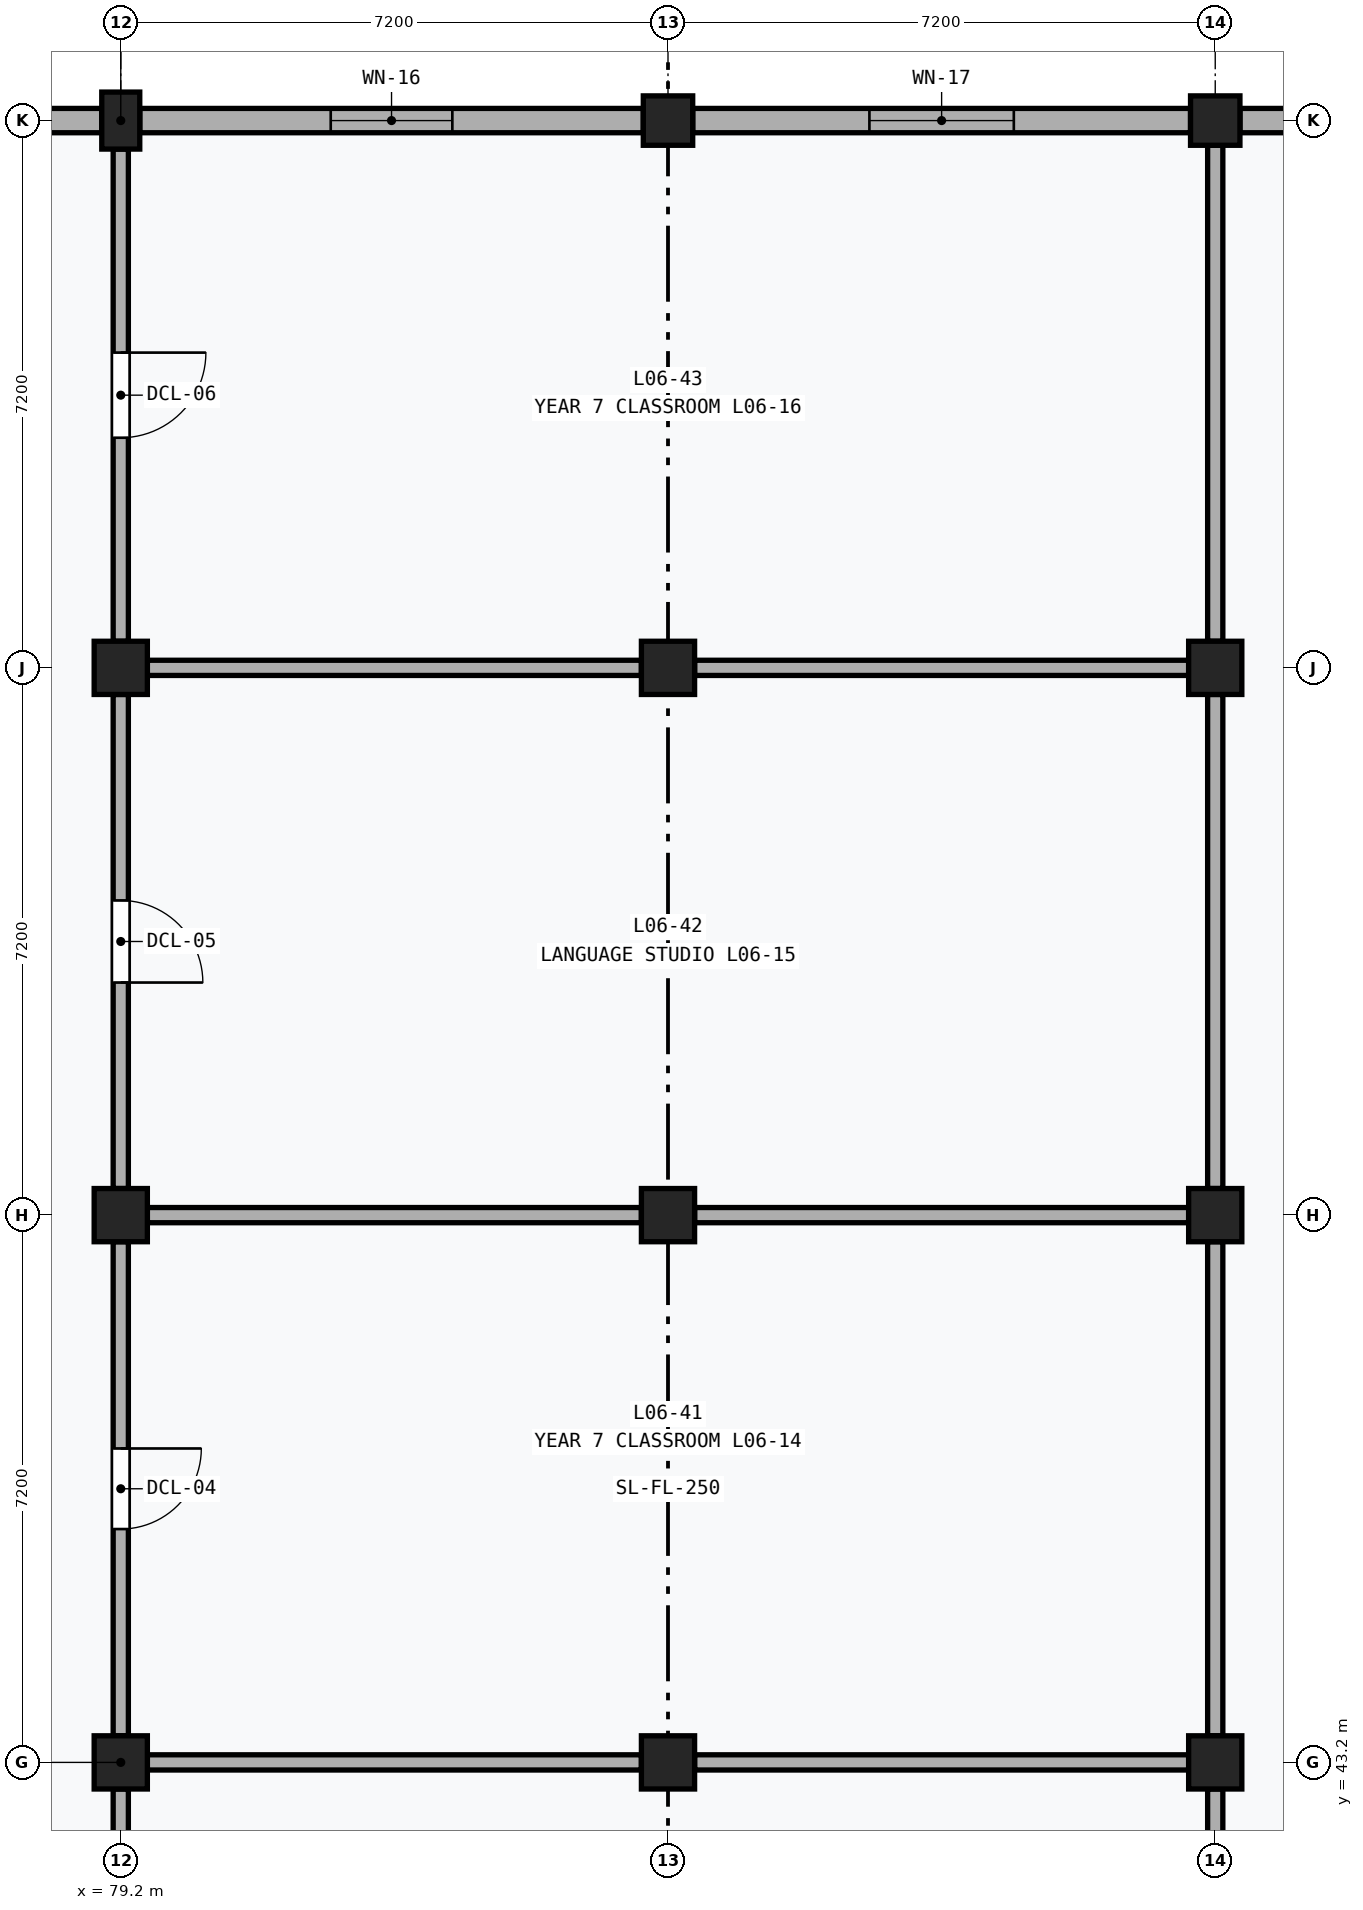
"""IFC4 building model, lengths in metres.
Left out: names, types, materials, properties, quantities, classifications, styles, units other than length and angle.
Written with IfcOpenShell. Run it as: python <this file> out.ifc"""

import sys

from ifc_helpers import new_model, si_unit, direction, frame, frame_2d, origin, origin_2d, place, context, subcontext, project, spatial, rectangle, extrude, element, fill, save


model = new_model("IFC4")
c1 = context("Model", 3, precision=1e-05, world=origin(), true_north=direction((0.0, 1.0)))
c2 = subcontext(c1, "Body", "Model", "MODEL_VIEW")
j1 = project(units=[si_unit("LENGTHUNIT", "METRE"), si_unit("PLANEANGLEUNIT", "RADIAN")], contexts=[c1])
p1 = place(None, origin())
s1 = spatial("IfcSite", under=j1, at=p1, CompositionType="ELEMENT")
p2 = place(p1, origin())
s2 = spatial("IfcBuilding", under=s1, at=p2, CompositionType="ELEMENT")
p3 = place(p2, frame((0.0, 0.0, 26.6)))
s3 = spatial("IfcBuildingStorey", under=s2, at=p3, CompositionType="ELEMENT", Elevation=26.6)
for number, where, z_axis, x_axis in (
    (1, (79.2, 43.2, 0.0), (0.0, 0.0, 1.0), (1.0, 0.0, 0.0)),
    (2, (79.2, 50.4, 0.0), (0.0, 0.0, 1.0), (1.0, 0.0, 0.0)),
    (3, (79.2, 57.6, 0.0), (0.0, 0.0, 1.0), (1.0, 0.0, 0.0)),
):
    element("IfcColumn", number, at=place(p3, frame(where, z_axis=z_axis, x_axis=x_axis)), inside=s3, PredefinedType="COLUMN", context=c2, shape_type="SweptSolid", body=[
        extrude(rectangle(XDim=0.7, YDim=0.7, at=origin_2d()), origin(), (0.0, 0.0, 1.0), 4.0),
    ])
p4 = place(p3, frame((79.2, 64.8, 0.0), z_axis=(0.0, 0.0, 1.0), x_axis=(1.0, 0.0, 0.0)))
e4 = element("IfcColumn", 4, at=p4, inside=s3, PredefinedType="PILASTER", context=c2, shape_type="SweptSolid", body=[
    extrude(rectangle(XDim=0.5, YDim=0.75, at=origin_2d()), origin(), (0.0, 0.0, 1.0), 4.0),
])
for number, where, z_axis, x_axis in (
    (5, (86.4, 43.2, 0.0), (0.0, 0.0, 1.0), (1.0, 0.0, 0.0)),
    (6, (86.4, 50.4, 0.0), (0.0, 0.0, 1.0), (1.0, 0.0, 0.0)),
    (7, (86.4, 57.6, 0.0), (0.0, 0.0, 1.0), (1.0, 0.0, 0.0)),
):
    element("IfcColumn", number, at=place(p3, frame(where, z_axis=z_axis, x_axis=x_axis)), inside=s3, PredefinedType="COLUMN", context=c2, shape_type="SweptSolid", body=[
        extrude(rectangle(XDim=0.7, YDim=0.7, at=origin_2d()), origin(), (0.0, 0.0, 1.0), 4.0),
    ])
p5 = place(p3, frame((86.4, 64.8, 0.0), z_axis=(0.0, 0.0, 1.0), x_axis=(1.0, 0.0, 0.0)))
e8 = element("IfcColumn", 8, at=p5, inside=s3, PredefinedType="COLUMN", context=c2, shape_type="SweptSolid", body=[
    extrude(rectangle(XDim=0.65, YDim=0.65, at=origin_2d()), origin(), (0.0, 0.0, 1.0), 4.0),
])
for number, where, z_axis, x_axis in (
    (9, (93.6, 43.2, 0.0), (0.0, 0.0, 1.0), (1.0, 0.0, 0.0)),
    (10, (93.6, 50.4, 0.0), (0.0, 0.0, 1.0), (1.0, 0.0, 0.0)),
    (11, (93.6, 57.6, 0.0), (0.0, 0.0, 1.0), (1.0, 0.0, 0.0)),
):
    element("IfcColumn", number, at=place(p3, frame(where, z_axis=z_axis, x_axis=x_axis)), inside=s3, PredefinedType="COLUMN", context=c2, shape_type="SweptSolid", body=[
        extrude(rectangle(XDim=0.7, YDim=0.7, at=origin_2d()), origin(), (0.0, 0.0, 1.0), 4.0),
    ])
p6 = place(p3, frame((93.6, 64.8, 0.0), z_axis=(0.0, 0.0, 1.0), x_axis=(1.0, 0.0, 0.0)))
e12 = element("IfcColumn", 12, at=p6, inside=s3, PredefinedType="COLUMN", context=c2, shape_type="SweptSolid", body=[
    extrude(rectangle(XDim=0.65, YDim=0.65, at=origin_2d()), origin(), (0.0, 0.0, 1.0), 4.0),
])
p7 = place(p3, frame((72.325, 64.8, 0.0), z_axis=(0.0, 0.0, 1.0), x_axis=(1.0, 0.0, 0.0)))
e13 = element("IfcWall", 13, at=p7, inside=s3, PredefinedType="SOLIDWALL", context=c2, shape_type="SweptSolid", body=[
    extrude(rectangle(XDim=6.625, YDim=0.32, at=frame_2d((3.312, 0.0))), origin(), (0.0, 0.0, 1.0), 3.1),
])
p8 = place(p7, frame((2.562, 0.0, 1.1)))
e14 = element("IfcOpeningElement", 14, at=p8, cuts=e13, PredefinedType="OPENING", context=c2, shape_type="SweptSolid", body=[
    extrude(rectangle(XDim=1.5, YDim=1.35, at=frame_2d((0.75, 0.675))), frame((0.0, 0.172, 0.0), z_axis=(0.0, -1.0, 0.0), x_axis=(1.0, 0.0, 0.0)), (0.0, 0.0, 1.0), 0.344),
])
p9 = place(p3, frame((79.45, 64.8, 0.0), z_axis=(0.0, 0.0, 1.0), x_axis=(1.0, 0.0, 0.0)))
e15 = element("IfcWall", 15, at=p9, inside=s3, PredefinedType="SOLIDWALL", context=c2, shape_type="SweptSolid", body=[
    extrude(rectangle(XDim=6.625, YDim=0.32, at=frame_2d((3.312, 0.0))), origin(), (0.0, 0.0, 1.0), 3.1),
])
p10 = place(p9, frame((2.512, 0.0, 1.1)))
e16 = element("IfcOpeningElement", 16, at=p10, cuts=e15, PredefinedType="OPENING", context=c2, shape_type="SweptSolid", body=[
    extrude(rectangle(XDim=1.6, YDim=1.5, at=frame_2d((0.8, 0.75))), frame((0.0, 0.172, 0.0), z_axis=(0.0, -1.0, 0.0), x_axis=(1.0, 0.0, 0.0)), (0.0, 0.0, 1.0), 0.344),
])
p11 = place(p3, frame((86.725, 64.8, 0.0), z_axis=(0.0, 0.0, 1.0), x_axis=(1.0, 0.0, 0.0)))
e17 = element("IfcWall", 17, at=p11, inside=s3, PredefinedType="SOLIDWALL", context=c2, shape_type="SweptSolid", body=[
    extrude(rectangle(XDim=6.55, YDim=0.32, at=frame_2d((3.275, 0.0))), origin(), (0.0, 0.0, 1.0), 3.1),
])
p12 = place(p11, frame((2.325, 0.0, 1.1)))
e18 = element("IfcOpeningElement", 18, at=p12, cuts=e17, PredefinedType="OPENING", context=c2, shape_type="SweptSolid", body=[
    extrude(rectangle(XDim=1.9, YDim=1.5, at=frame_2d((0.95, 0.75))), frame((0.0, 0.172, 0.0), z_axis=(0.0, -1.0, 0.0), x_axis=(1.0, 0.0, 0.0)), (0.0, 0.0, 1.0), 0.344),
])
p13 = place(p3, frame((93.925, 64.8, 0.0), z_axis=(0.0, 0.0, 1.0), x_axis=(1.0, 0.0, 0.0)))
e19 = element("IfcWall", 19, at=p13, inside=s3, PredefinedType="SOLIDWALL", context=c2, shape_type="SweptSolid", body=[
    extrude(rectangle(XDim=6.55, YDim=0.32, at=frame_2d((3.275, 0.0))), origin(), (0.0, 0.0, 1.0), 3.1),
])
p14 = place(p13, frame((2.175, 0.0, 1.1)))
e20 = element("IfcOpeningElement", 20, at=p14, cuts=e19, PredefinedType="OPENING", context=c2, shape_type="SweptSolid", body=[
    extrude(rectangle(XDim=2.2, YDim=1.5, at=frame_2d((1.1, 0.75))), frame((0.0, 0.172, 0.0), z_axis=(0.0, -1.0, 0.0), x_axis=(1.0, 0.0, 0.0)), (0.0, 0.0, 1.0), 0.344),
])
p15 = place(p3, frame((79.55, 43.2, 0.0), z_axis=(0.0, 0.0, 1.0), x_axis=(1.0, 0.0, 0.0)))
e21 = element("IfcWall", 21, at=p15, inside=s3, PredefinedType="PARTITIONING", context=c2, shape_type="SweptSolid", body=[
    extrude(rectangle(XDim=6.5, YDim=0.2, at=frame_2d((3.25, 0.0))), origin(), (0.0, 0.0, 1.0), 2.96),
])
p16 = place(p3, frame((79.2, 36.35, 0.0), z_axis=(0.0, 0.0, 1.0), x_axis=(0.0, 1.0, 0.0)))
e22 = element("IfcWall", 22, at=p16, inside=s3, PredefinedType="PARTITIONING", context=c2, shape_type="SweptSolid", body=[
    extrude(rectangle(XDim=6.5, YDim=0.2, at=frame_2d((3.25, 0.0))), origin(), (0.0, 0.0, 1.0), 2.96),
])
p17 = place(p16, frame((2.73, 0.0, 0.0)))
e23 = element("IfcOpeningElement", 23, at=p17, cuts=e22, PredefinedType="OPENING", context=c2, shape_type="SweptSolid", body=[
    extrude(rectangle(XDim=1.04, YDim=2.14, at=frame_2d((0.52, 1.07))), frame((0.0, 0.112, 0.0), z_axis=(0.0, -1.0, 0.0), x_axis=(1.0, 0.0, 0.0)), (0.0, 0.0, 1.0), 0.224),
])
for number, where, z_axis, x_axis in (
    (24, (86.75, 43.2, 0.0), (0.0, 0.0, 1.0), (1.0, 0.0, 0.0)),
    (25, (93.6, 36.35, 0.0), (0.0, 0.0, 1.0), (0.0, 1.0, 0.0)),
    (26, (79.55, 50.4, 0.0), (0.0, 0.0, 1.0), (1.0, 0.0, 0.0)),
):
    element("IfcWall", number, at=place(p3, frame(where, z_axis=z_axis, x_axis=x_axis)), inside=s3, PredefinedType="PARTITIONING", context=c2, shape_type="SweptSolid", body=[
        extrude(rectangle(XDim=6.5, YDim=0.2, at=frame_2d((3.25, 0.0))), origin(), (0.0, 0.0, 1.0), 2.96),
    ])
p18 = place(p3, frame((79.2, 43.55, 0.0), z_axis=(0.0, 0.0, 1.0), x_axis=(0.0, 1.0, 0.0)))
e27 = element("IfcWall", 27, at=p18, inside=s3, PredefinedType="PARTITIONING", context=c2, shape_type="SweptSolid", body=[
    extrude(rectangle(XDim=6.5, YDim=0.2, at=frame_2d((3.25, 0.0))), origin(), (0.0, 0.0, 1.0), 2.96),
])
p19 = place(p18, frame((2.72, 0.0, 0.0)))
e28 = element("IfcOpeningElement", 28, at=p19, cuts=e27, PredefinedType="OPENING", context=c2, shape_type="SweptSolid", body=[
    extrude(rectangle(XDim=1.06, YDim=2.16, at=frame_2d((0.53, 1.08))), frame((0.0, 0.112, 0.0), z_axis=(0.0, -1.0, 0.0), x_axis=(1.0, 0.0, 0.0)), (0.0, 0.0, 1.0), 0.224),
])
for number, where, z_axis, x_axis in (
    (29, (86.75, 50.4, 0.0), (0.0, 0.0, 1.0), (1.0, 0.0, 0.0)),
    (30, (93.6, 43.55, 0.0), (0.0, 0.0, 1.0), (0.0, 1.0, 0.0)),
    (31, (79.55, 57.6, 0.0), (0.0, 0.0, 1.0), (1.0, 0.0, 0.0)),
):
    element("IfcWall", number, at=place(p3, frame(where, z_axis=z_axis, x_axis=x_axis)), inside=s3, PredefinedType="PARTITIONING", context=c2, shape_type="SweptSolid", body=[
        extrude(rectangle(XDim=6.5, YDim=0.2, at=frame_2d((3.25, 0.0))), origin(), (0.0, 0.0, 1.0), 2.96),
    ])
p20 = place(p3, frame((79.2, 50.75, 0.0), z_axis=(0.0, 0.0, 1.0), x_axis=(0.0, 1.0, 0.0)))
e32 = element("IfcWall", 32, at=p20, inside=s3, PredefinedType="PARTITIONING", context=c2, shape_type="SweptSolid", body=[
    extrude(rectangle(XDim=6.5, YDim=0.2, at=frame_2d((3.25, 0.0))), origin(), (0.0, 0.0, 1.0), 2.96),
])
p21 = place(p20, frame((2.71, 0.0, 0.0)))
e33 = element("IfcOpeningElement", 33, at=p21, cuts=e32, PredefinedType="OPENING", context=c2, shape_type="SweptSolid", body=[
    extrude(rectangle(XDim=1.08, YDim=2.18, at=frame_2d((0.54, 1.09))), frame((0.0, 0.112, 0.0), z_axis=(0.0, -1.0, 0.0), x_axis=(1.0, 0.0, 0.0)), (0.0, 0.0, 1.0), 0.224),
])
p22 = place(p3, frame((86.75, 57.6, 0.0), z_axis=(0.0, 0.0, 1.0), x_axis=(1.0, 0.0, 0.0)))
e34 = element("IfcWall", 34, at=p22, inside=s3, PredefinedType="PARTITIONING", context=c2, shape_type="SweptSolid", body=[
    extrude(rectangle(XDim=6.5, YDim=0.2, at=frame_2d((3.25, 0.0))), origin(), (0.0, 0.0, 1.0), 3.03),
])
p23 = place(p3, frame((93.6, 50.75, 0.0), z_axis=(0.0, 0.0, 1.0), x_axis=(0.0, 1.0, 0.0)))
e35 = element("IfcWall", 35, at=p23, inside=s3, PredefinedType="PARTITIONING", context=c2, shape_type="SweptSolid", body=[
    extrude(rectangle(XDim=6.5, YDim=0.2, at=frame_2d((3.25, 0.0))), origin(), (0.0, 0.0, 1.0), 2.96),
])
p24 = place(p3, frame((79.2, 57.95, 0.0), z_axis=(0.0, 0.0, 1.0), x_axis=(0.0, 1.0, 0.0)))
e36 = element("IfcWall", 36, at=p24, inside=s3, PredefinedType="PARTITIONING", context=c2, shape_type="SweptSolid", body=[
    extrude(rectangle(XDim=6.475, YDim=0.2, at=frame_2d((3.238, 0.0))), origin(), (0.0, 0.0, 1.0), 2.96),
])
p25 = place(p24, frame((2.677, 0.0, 0.0)))
e37 = element("IfcOpeningElement", 37, at=p25, cuts=e36, PredefinedType="OPENING", context=c2, shape_type="SweptSolid", body=[
    extrude(rectangle(XDim=1.12, YDim=2.2, at=frame_2d((0.56, 1.1))), frame((0.0, 0.112, 0.0), z_axis=(0.0, -1.0, 0.0), x_axis=(1.0, 0.0, 0.0)), (0.0, 0.0, 1.0), 0.224),
])
p26 = place(p3, frame((93.6, 57.95, 0.0), z_axis=(0.0, 0.0, 1.0), x_axis=(0.0, 1.0, 0.0)))
e38 = element("IfcWall", 38, at=p26, inside=s3, PredefinedType="PARTITIONING", context=c2, shape_type="SweptSolid", body=[
    extrude(rectangle(XDim=6.525, YDim=0.2, at=frame_2d((3.263, 0.0))), origin(), (0.0, 0.0, 1.0), 2.96),
])
p27 = place(p10, origin())
e39 = element("IfcWindow", 39, at=p27, inside=s3, PartitioningType="SINGLE_PANEL", PredefinedType="WINDOW", context=c2, shape_type="SweptSolid", body=[
    extrude(rectangle(XDim=1.6, YDim=1.5, at=frame_2d((0.8, 0.75))), frame((0.0, 0.03, 0.0), z_axis=(0.0, -1.0, 0.0), x_axis=(1.0, 0.0, 0.0)), (0.0, 0.0, 1.0), 0.06),
])
fill(e16, e39)
p28 = place(p12, origin())
e40 = element("IfcWindow", 40, at=p28, inside=s3, PartitioningType="SINGLE_PANEL", PredefinedType="WINDOW", context=c2, shape_type="SweptSolid", body=[
    extrude(rectangle(XDim=1.9, YDim=1.5, at=frame_2d((0.95, 0.75))), frame((0.0, 0.03, 0.0), z_axis=(0.0, -1.0, 0.0), x_axis=(1.0, 0.0, 0.0)), (0.0, 0.0, 1.0), 0.06),
])
fill(e18, e40)
p29 = place(p19, frame((1.06, 0.0, 0.0), z_axis=(0.0, 0.0, 1.0), x_axis=(-1.0, 0.0, 0.0)))
e41 = element("IfcDoor", 41, at=p29, inside=s3, OperationType="SINGLE_SWING_LEFT", PredefinedType="DOOR", context=c2, shape_type="SweptSolid", body=[
    extrude(rectangle(XDim=1.06, YDim=2.16, at=frame_2d((0.53, 1.08))), frame((0.0, 0.025, 0.0), z_axis=(0.0, -1.0, 0.0), x_axis=(1.0, 0.0, 0.0)), (0.0, 0.0, 1.0), 0.05),
])
fill(e28, e41)
p30 = place(p21, frame((1.08, 0.0, 0.0), z_axis=(0.0, 0.0, 1.0), x_axis=(-1.0, 0.0, 0.0)))
e42 = element("IfcDoor", 42, at=p30, inside=s3, OperationType="SINGLE_SWING_RIGHT", PredefinedType="DOOR", context=c2, shape_type="SweptSolid", body=[
    extrude(rectangle(XDim=1.08, YDim=2.18, at=frame_2d((0.54, 1.09))), frame((0.0, 0.025, 0.0), z_axis=(0.0, -1.0, 0.0), x_axis=(1.0, 0.0, 0.0)), (0.0, 0.0, 1.0), 0.05),
])
fill(e33, e42)
p31 = place(p25, frame((1.12, 0.0, 0.0), z_axis=(0.0, 0.0, 1.0), x_axis=(-1.0, 0.0, 0.0)))
e43 = element("IfcDoor", 43, at=p31, inside=s3, OperationType="SINGLE_SWING_LEFT", PredefinedType="DOOR", context=c2, shape_type="SweptSolid", body=[
    extrude(rectangle(XDim=1.12, YDim=2.2, at=frame_2d((0.56, 1.1))), frame((0.0, 0.025, 0.0), z_axis=(0.0, -1.0, 0.0), x_axis=(1.0, 0.0, 0.0)), (0.0, 0.0, 1.0), 0.05),
])
fill(e37, e43)
save(model, sys.argv[1])
